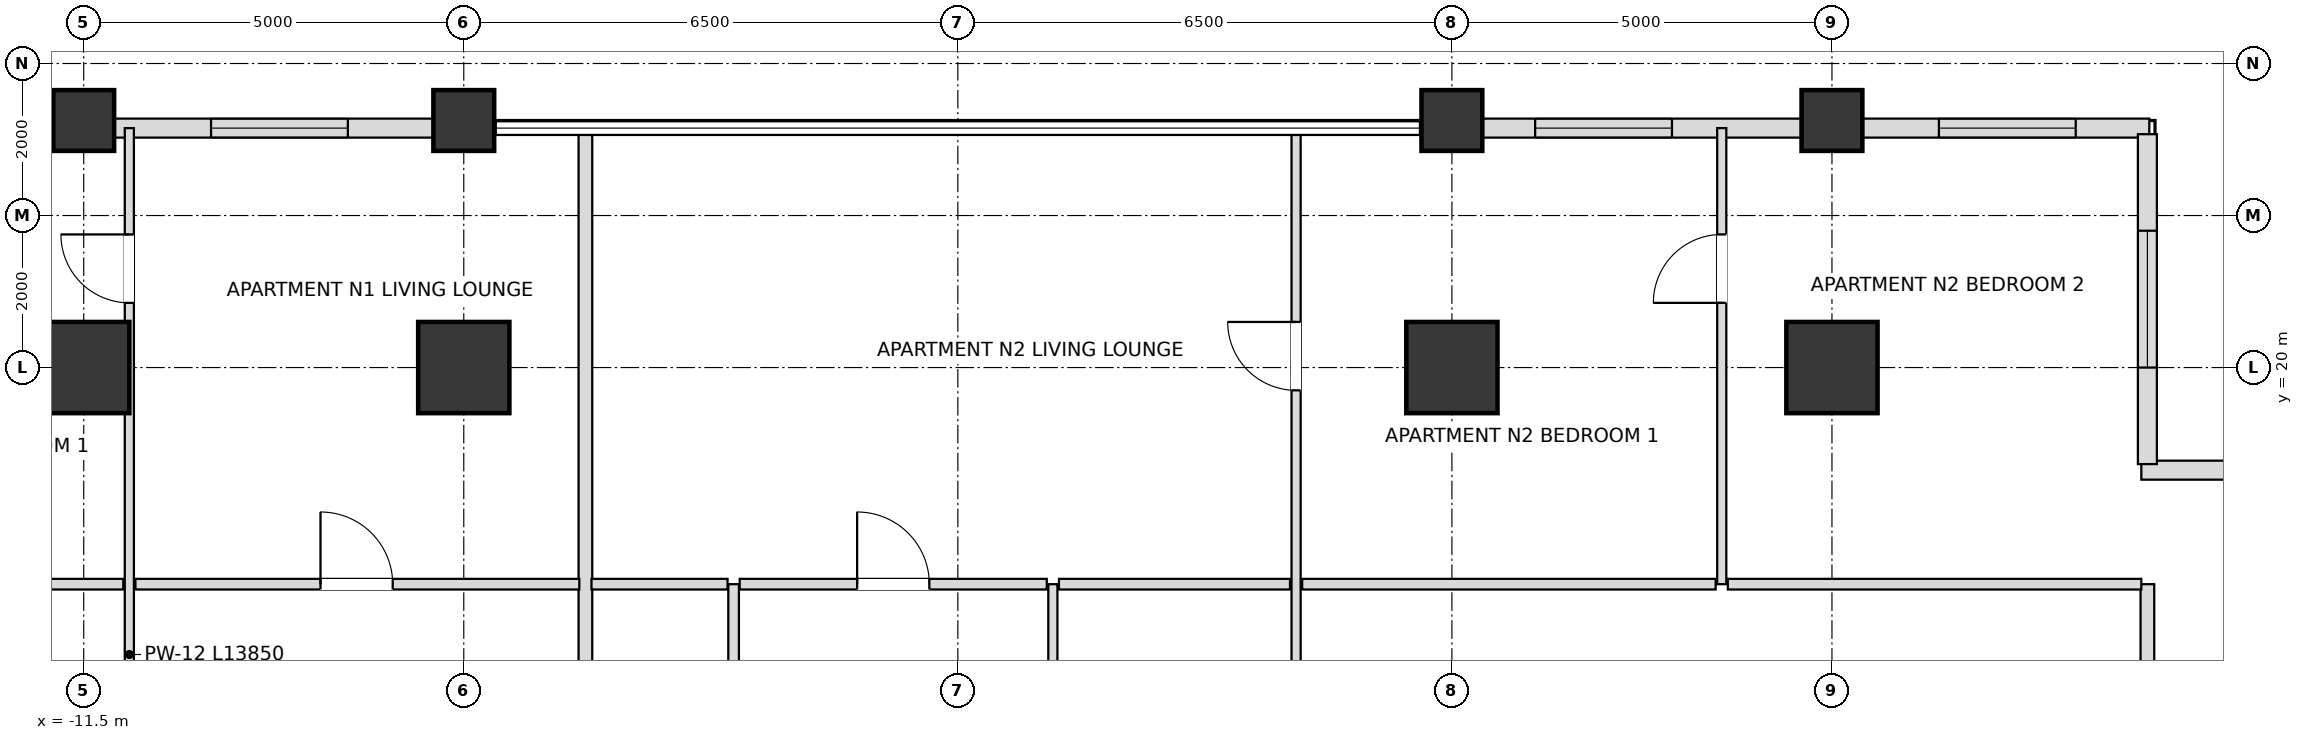
"""IFC4 building model, lengths in metres.
Left out: names, types, materials, properties, quantities, classifications, styles, units other than length and angle.
Written with IfcOpenShell. Run it as: python <this file> out.ifc"""

import sys

from ifc_helpers import new_model, si_unit, direction, frame, frame_2d, origin, origin_2d, place, context, subcontext, project, spatial, rectangle, extrude, element, fill, save


model = new_model("IFC4")
c1 = context("Model", 3, precision=1e-05, world=origin(), true_north=direction((0.0, 1.0)))
c2 = subcontext(c1, "Body", "Model", "MODEL_VIEW")
j1 = project(units=[si_unit("LENGTHUNIT", "METRE"), si_unit("PLANEANGLEUNIT", "RADIAN")], contexts=[c1])
p1 = place(None, origin())
s1 = spatial("IfcSite", under=j1, at=p1, CompositionType="ELEMENT")
p2 = place(p1, origin())
s2 = spatial("IfcBuilding", under=s1, at=p2, CompositionType="ELEMENT")
p3 = place(p2, frame((0.0, 0.0, 117.0)))
s3 = spatial("IfcBuildingStorey", under=s2, at=p3, CompositionType="ELEMENT", Elevation=117.0)
for number, where, z_axis, x_axis in (
    (1, (11.5, 20.0, 0.0), (0.0, 0.0, 1.0), (1.0, 0.0, 0.0)),
    (2, (6.5, 20.0, 0.0), (0.0, 0.0, 1.0), (1.0, 0.0, 0.0)),
    (3, (-6.5, 20.0, 0.0), (0.0, 0.0, 1.0), (1.0, 0.0, 0.0)),
    (4, (-11.5, 20.0, 0.0), (0.0, 0.0, 1.0), (1.0, 0.0, 0.0)),
):
    element("IfcColumn", number, at=place(p3, frame(where, z_axis=z_axis, x_axis=x_axis)), inside=s3, PredefinedType="USERDEFINED", context=c2, shape_type="SweptSolid", body=[
        extrude(rectangle(XDim=1.2, YDim=1.2, at=origin_2d()), origin(), (0.0, 0.0, 1.0), 3.6),
    ])
for number, where, z_axis, x_axis in (
    (5, (-11.5, 23.25, 0.0), (0.0, 0.0, 1.0), (1.0, 0.0, 0.0)),
    (6, (-6.5, 23.25, 0.0), (0.0, 0.0, 1.0), (1.0, 0.0, 0.0)),
    (7, (6.5, 23.25, 0.0), (0.0, 0.0, 1.0), (1.0, 0.0, 0.0)),
    (8, (11.5, 23.25, 0.0), (0.0, 0.0, 1.0), (1.0, 0.0, 0.0)),
):
    element("IfcColumn", number, at=place(p3, frame(where, z_axis=z_axis, x_axis=x_axis)), inside=s3, PredefinedType="COLUMN", context=c2, shape_type="SweptSolid", body=[
        extrude(rectangle(XDim=0.8, YDim=0.8, at=origin_2d()), origin(), (0.0, 0.0, 1.0), 3.6),
    ])
p4 = place(p3, frame((15.675, 23.15, 0.0), z_axis=(0.0, 0.0, 1.0), x_axis=(-1.0, 0.0, 0.0)))
e9 = element("IfcWall", 9, at=p4, inside=s3, PredefinedType="SOLIDWALL", context=c2, shape_type="SweptSolid", body=[
    extrude(rectangle(XDim=3.78, YDim=0.25, at=frame_2d((1.89, 0.0))), origin(), (0.0, 0.0, 1.0), 2.656),
])
p5 = place(p4, frame((0.968, 0.0, 0.72)))
e10 = element("IfcOpeningElement", 10, at=p5, cuts=e9, PredefinedType="OPENING", context=c2, shape_type="SweptSolid", body=[
    extrude(rectangle(XDim=1.8, YDim=1.68, at=frame_2d((0.9, 0.84))), frame((0.0, 0.135, 0.0), z_axis=(0.0, -1.0, 0.0), x_axis=(1.0, 0.0, 0.0)), (0.0, 0.0, 1.0), 0.27),
])
p6 = place(p3, frame((11.105, 23.15, 0.0), z_axis=(0.0, 0.0, 1.0), x_axis=(-1.0, 0.0, 0.0)))
e11 = element("IfcWall", 11, at=p6, inside=s3, PredefinedType="SOLIDWALL", context=c2, shape_type="SweptSolid", body=[
    extrude(rectangle(XDim=4.21, YDim=0.25, at=frame_2d((2.105, 0.0))), origin(), (0.0, 0.0, 1.0), 2.656),
])
p7 = place(p6, frame((1.71, 0.0, 0.72)))
e12 = element("IfcOpeningElement", 12, at=p7, cuts=e11, PredefinedType="OPENING", context=c2, shape_type="SweptSolid", body=[
    extrude(rectangle(XDim=1.8, YDim=1.68, at=frame_2d((0.9, 0.84))), frame((0.0, 0.135, 0.0), z_axis=(0.0, -1.0, 0.0), x_axis=(1.0, 0.0, 0.0)), (0.0, 0.0, 1.0), 0.27),
])
p8 = place(p3, frame((-6.895, 23.15, 0.0), z_axis=(0.0, 0.0, 1.0), x_axis=(-1.0, 0.0, 0.0)))
e13 = element("IfcWall", 13, at=p8, inside=s3, PredefinedType="SOLIDWALL", context=c2, shape_type="SweptSolid", body=[
    extrude(rectangle(XDim=4.21, YDim=0.25, at=frame_2d((2.105, 0.0))), origin(), (0.0, 0.0, 1.0), 2.656),
])
p9 = place(p8, frame((1.13, 0.0, 0.72)))
e14 = element("IfcOpeningElement", 14, at=p9, cuts=e13, PredefinedType="OPENING", context=c2, shape_type="SweptSolid", body=[
    extrude(rectangle(XDim=1.8, YDim=1.68, at=frame_2d((0.9, 0.84))), frame((0.0, 0.135, 0.0), z_axis=(0.0, -1.0, 0.0), x_axis=(1.0, 0.0, 0.0)), (0.0, 0.0, 1.0), 0.27),
])
p10 = place(p3, frame((-11.895, 23.15, 0.0), z_axis=(0.0, 0.0, 1.0), x_axis=(-1.0, 0.0, 0.0)))
e15 = element("IfcWall", 15, at=p10, inside=s3, PredefinedType="SOLIDWALL", context=c2, shape_type="SweptSolid", body=[
    extrude(rectangle(XDim=3.78, YDim=0.25, at=frame_2d((1.89, 0.0))), origin(), (0.0, 0.0, 1.0), 2.656),
])
p11 = place(p10, frame((1.013, 0.0, 0.72)))
e16 = element("IfcOpeningElement", 16, at=p11, cuts=e15, PredefinedType="OPENING", context=c2, shape_type="SweptSolid", body=[
    extrude(rectangle(XDim=1.8, YDim=1.68, at=frame_2d((0.9, 0.84))), frame((0.0, 0.135, 0.0), z_axis=(0.0, -1.0, 0.0), x_axis=(1.0, 0.0, 0.0)), (0.0, 0.0, 1.0), 0.27),
])
p12 = place(p3, frame((20.23, 18.65, 0.0), z_axis=(0.0, 0.0, 1.0), x_axis=(-1.0, 0.0, 0.0)))
e17 = element("IfcWall", 17, at=p12, inside=s3, PredefinedType="SOLIDWALL", context=c2, shape_type="SweptSolid", body=[
    extrude(rectangle(XDim=4.66, YDim=0.25, at=frame_2d((2.33, 0.0))), origin(), (0.0, 0.0, 1.0), 2.656),
])
p13 = place(p12, frame((1.43, 0.0, 0.72)))
e18 = element("IfcOpeningElement", 18, at=p13, cuts=e17, PredefinedType="OPENING", context=c2, shape_type="SweptSolid", body=[
    extrude(rectangle(XDim=1.8, YDim=1.68, at=frame_2d((0.9, 0.84))), frame((0.0, 0.135, 0.0), z_axis=(0.0, -1.0, 0.0), x_axis=(1.0, 0.0, 0.0)), (0.0, 0.0, 1.0), 0.27),
])
p14 = place(p3, frame((15.65, 18.73, 0.0), z_axis=(0.0, 0.0, 1.0), x_axis=(0.0, 1.0, 0.0)))
e19 = element("IfcWall", 19, at=p14, inside=s3, PredefinedType="SOLIDWALL", context=c2, shape_type="SweptSolid", body=[
    extrude(rectangle(XDim=4.34, YDim=0.25, at=frame_2d((2.17, 0.0))), origin(), (0.0, 0.0, 1.0), 2.656),
])
p15 = place(p14, frame((1.27, 0.0, 0.72)))
e20 = element("IfcOpeningElement", 20, at=p15, cuts=e19, PredefinedType="OPENING", context=c2, shape_type="SweptSolid", body=[
    extrude(rectangle(XDim=1.8, YDim=1.68, at=frame_2d((0.9, 0.84))), frame((0.0, 0.135, 0.0), z_axis=(0.0, -1.0, 0.0), x_axis=(1.0, 0.0, 0.0)), (0.0, 0.0, 1.0), 0.27),
])
p16 = place(p3, frame((-10.9, 9.3, 0.0), z_axis=(0.0, 0.0, 1.0), x_axis=(0.0, 1.0, 0.0)))
e21 = element("IfcWall", 21, at=p16, inside=s3, PredefinedType="PARTITIONING", context=c2, shape_type="SweptSolid", body=[
    extrude(rectangle(XDim=13.85, YDim=0.12, at=frame_2d((6.925, 0.0))), origin(), (0.0, 0.0, 1.0), 2.736),
])
p17 = place(p16, frame((4.219, 0.0, 0.0)))
e22 = element("IfcOpeningElement", 22, at=p17, cuts=e21, PredefinedType="OPENING", context=c2, shape_type="SweptSolid", body=[
    extrude(rectangle(XDim=0.95, YDim=2.1, at=frame_2d((0.475, 1.05))), frame((0.0, 0.07, 0.0), z_axis=(0.0, -1.0, 0.0), x_axis=(1.0, 0.0, 0.0)), (0.0, 0.0, 1.0), 0.14),
])
p18 = place(p16, frame((11.551, 0.0, 0.0)))
e23 = element("IfcOpeningElement", 23, at=p18, cuts=e21, PredefinedType="OPENING", context=c2, shape_type="SweptSolid", body=[
    extrude(rectangle(XDim=0.9, YDim=2.1, at=frame_2d((0.45, 1.05))), frame((0.0, 0.07, 0.0), z_axis=(0.0, -1.0, 0.0), x_axis=(1.0, 0.0, 0.0)), (0.0, 0.0, 1.0), 0.14),
])
p19 = place(p3, frame((-4.9, 9.3, 0.0), z_axis=(0.0, 0.0, 1.0), x_axis=(0.0, 1.0, 0.0)))
e24 = element("IfcWall", 24, at=p19, inside=s3, PredefinedType="PARTITIONING", context=c2, shape_type="SweptSolid", body=[
    extrude(rectangle(XDim=13.85, YDim=0.18, at=frame_2d((6.925, 0.0))), origin(), (0.0, 0.0, 1.0), 2.736),
])
p20 = place(p3, frame((-2.95, 9.3, 0.0), z_axis=(0.0, 0.0, 1.0), x_axis=(0.0, 1.0, 0.0)))
e25 = element("IfcWall", 25, at=p20, inside=s3, PredefinedType="PARTITIONING", context=c2, shape_type="SweptSolid", body=[
    extrude(rectangle(XDim=7.85, YDim=0.14, at=frame_2d((3.925, 0.0))), origin(), (0.0, 0.0, 1.0), 3.3),
])
p21 = place(p20, frame((3.47, 0.0, 0.0)))
e26 = element("IfcOpeningElement", 26, at=p21, cuts=e25, PredefinedType="OPENING", context=c2, shape_type="SweptSolid", body=[
    extrude(rectangle(XDim=0.9, YDim=2.1, at=frame_2d((0.45, 1.05))), frame((0.0, 0.08, 0.0), z_axis=(0.0, -1.0, 0.0), x_axis=(1.0, 0.0, 0.0)), (0.0, 0.0, 1.0), 0.16),
])
p22 = place(p3, frame((1.25, 9.3, 0.0), z_axis=(0.0, 0.0, 1.0), x_axis=(0.0, 1.0, 0.0)))
e27 = element("IfcWall", 27, at=p22, inside=s3, PredefinedType="PARTITIONING", context=c2, shape_type="SweptSolid", body=[
    extrude(rectangle(XDim=7.85, YDim=0.12, at=frame_2d((3.925, 0.0))), origin(), (0.0, 0.0, 1.0), 3.3),
])
p23 = place(p22, frame((3.445, 0.0, 0.0)))
e28 = element("IfcOpeningElement", 28, at=p23, cuts=e27, PredefinedType="OPENING", context=c2, shape_type="SweptSolid", body=[
    extrude(rectangle(XDim=0.95, YDim=2.1, at=frame_2d((0.475, 1.05))), frame((0.0, 0.07, 0.0), z_axis=(0.0, -1.0, 0.0), x_axis=(1.0, 0.0, 0.0)), (0.0, 0.0, 1.0), 0.14),
])
p24 = place(p3, frame((4.45, 9.3, 0.0), z_axis=(0.0, 0.0, 1.0), x_axis=(0.0, 1.0, 0.0)))
e29 = element("IfcWall", 29, at=p24, inside=s3, PredefinedType="PARTITIONING", context=c2, shape_type="SweptSolid", body=[
    extrude(rectangle(XDim=13.85, YDim=0.12, at=frame_2d((6.925, 0.0))), origin(), (0.0, 0.0, 1.0), 2.736),
])
p25 = place(p24, frame((3.445, 0.0, 0.0)))
e30 = element("IfcOpeningElement", 30, at=p25, cuts=e29, PredefinedType="OPENING", context=c2, shape_type="SweptSolid", body=[
    extrude(rectangle(XDim=0.95, YDim=2.1, at=frame_2d((0.475, 1.05))), frame((0.0, 0.07, 0.0), z_axis=(0.0, -1.0, 0.0), x_axis=(1.0, 0.0, 0.0)), (0.0, 0.0, 1.0), 0.14),
])
p26 = place(p24, frame((10.4, 0.0, 0.0)))
e31 = element("IfcOpeningElement", 31, at=p26, cuts=e29, PredefinedType="OPENING", context=c2, shape_type="SweptSolid", body=[
    extrude(rectangle(XDim=0.9, YDim=2.1, at=frame_2d((0.45, 1.05))), frame((0.0, 0.07, 0.0), z_axis=(0.0, -1.0, 0.0), x_axis=(1.0, 0.0, 0.0)), (0.0, 0.0, 1.0), 0.14),
])
p27 = place(p3, frame((10.05, 17.15, 0.0), z_axis=(0.0, 0.0, 1.0), x_axis=(0.0, 1.0, 0.0)))
e32 = element("IfcWall", 32, at=p27, inside=s3, PredefinedType="PARTITIONING", context=c2, shape_type="SweptSolid", body=[
    extrude(rectangle(XDim=6.0, YDim=0.12, at=frame_2d((3.0, 0.0))), origin(), (0.0, 0.0, 1.0), 2.736),
])
p28 = place(p27, frame((3.701, 0.0, 0.0)))
e33 = element("IfcOpeningElement", 33, at=p28, cuts=e32, PredefinedType="OPENING", context=c2, shape_type="SweptSolid", body=[
    extrude(rectangle(XDim=0.9, YDim=2.1, at=frame_2d((0.45, 1.05))), frame((0.0, 0.07, 0.0), z_axis=(0.0, -1.0, 0.0), x_axis=(1.0, 0.0, 0.0)), (0.0, 0.0, 1.0), 0.14),
])
p29 = place(p3, frame((15.65, 9.3, 0.0), z_axis=(0.0, 0.0, 1.0), x_axis=(0.0, 1.0, 0.0)))
e34 = element("IfcWall", 34, at=p29, inside=s3, PredefinedType="PARTITIONING", context=c2, shape_type="SweptSolid", body=[
    extrude(rectangle(XDim=7.85, YDim=0.18, at=frame_2d((3.925, 0.0))), origin(), (0.0, 0.0, 1.0), 2.656),
])
p30 = place(p3, frame((-13.62, 17.15, 0.0), z_axis=(0.0, 0.0, 1.0), x_axis=(1.0, 0.0, 0.0)))
e35 = element("IfcWall", 35, at=p30, inside=s3, PredefinedType="PARTITIONING", context=c2, shape_type="SweptSolid", body=[
    extrude(rectangle(XDim=2.64, YDim=0.14, at=frame_2d((1.32, 0.0))), origin(), (0.0, 0.0, 1.0), 2.656),
])
p31 = place(p3, frame((-10.82, 17.15, 0.0), z_axis=(0.0, 0.0, 1.0), x_axis=(1.0, 0.0, 0.0)))
e36 = element("IfcWall", 36, at=p31, inside=s3, PredefinedType="PARTITIONING", context=c2, shape_type="SweptSolid", body=[
    extrude(rectangle(XDim=5.84, YDim=0.14, at=frame_2d((2.92, 0.0))), origin(), (0.0, 0.0, 1.0), 2.736),
])
p32 = place(p31, frame((2.435, 0.0, 0.0)))
e37 = element("IfcOpeningElement", 37, at=p32, cuts=e36, PredefinedType="OPENING", context=c2, shape_type="SweptSolid", body=[
    extrude(rectangle(XDim=0.95, YDim=2.1, at=frame_2d((0.475, 1.05))), frame((0.0, 0.08, 0.0), z_axis=(0.0, -1.0, 0.0), x_axis=(1.0, 0.0, 0.0)), (0.0, 0.0, 1.0), 0.16),
])
p33 = place(p3, frame((-4.82, 17.15, 0.0), z_axis=(0.0, 0.0, 1.0), x_axis=(1.0, 0.0, 0.0)))
e38 = element("IfcWall", 38, at=p33, inside=s3, PredefinedType="PARTITIONING", context=c2, shape_type="SweptSolid", body=[
    extrude(rectangle(XDim=1.79, YDim=0.14, at=frame_2d((0.895, 0.0))), origin(), (0.0, 0.0, 1.0), 3.3),
])
p34 = place(p3, frame((-2.87, 17.15, 0.0), z_axis=(0.0, 0.0, 1.0), x_axis=(1.0, 0.0, 0.0)))
e39 = element("IfcWall", 39, at=p34, inside=s3, PredefinedType="PARTITIONING", context=c2, shape_type="SweptSolid", body=[
    extrude(rectangle(XDim=4.04, YDim=0.14, at=frame_2d((2.02, 0.0))), origin(), (0.0, 0.0, 1.0), 3.3),
])
p35 = place(p34, frame((1.545, 0.0, 0.0)))
e40 = element("IfcOpeningElement", 40, at=p35, cuts=e39, PredefinedType="OPENING", context=c2, shape_type="SweptSolid", body=[
    extrude(rectangle(XDim=0.95, YDim=2.1, at=frame_2d((0.475, 1.05))), frame((0.0, 0.08, 0.0), z_axis=(0.0, -1.0, 0.0), x_axis=(1.0, 0.0, 0.0)), (0.0, 0.0, 1.0), 0.16),
])
p36 = place(p3, frame((1.33, 17.15, 0.0), z_axis=(0.0, 0.0, 1.0), x_axis=(1.0, 0.0, 0.0)))
e41 = element("IfcWall", 41, at=p36, inside=s3, PredefinedType="PARTITIONING", context=c2, shape_type="SweptSolid", body=[
    extrude(rectangle(XDim=3.04, YDim=0.14, at=frame_2d((1.52, 0.0))), origin(), (0.0, 0.0, 1.0), 3.3),
])
p37 = place(p3, frame((4.53, 17.15, 0.0), z_axis=(0.0, 0.0, 1.0), x_axis=(1.0, 0.0, 0.0)))
e42 = element("IfcWall", 42, at=p37, inside=s3, PredefinedType="PARTITIONING", context=c2, shape_type="SweptSolid", body=[
    extrude(rectangle(XDim=5.44, YDim=0.14, at=frame_2d((2.72, 0.0))), origin(), (0.0, 0.0, 1.0), 2.736),
])
p38 = place(p3, frame((10.13, 17.15, 0.0), z_axis=(0.0, 0.0, 1.0), x_axis=(1.0, 0.0, 0.0)))
e43 = element("IfcWall", 43, at=p38, inside=s3, PredefinedType="PARTITIONING", context=c2, shape_type="SweptSolid", body=[
    extrude(rectangle(XDim=5.44, YDim=0.14, at=frame_2d((2.72, 0.0))), origin(), (0.0, 0.0, 1.0), 2.656),
])
p39 = place(p5, origin())
e44 = element("IfcWindow", 44, at=p39, inside=s3, PartitioningType="SINGLE_PANEL", PredefinedType="WINDOW", context=c2, shape_type="SweptSolid", body=[
    extrude(rectangle(XDim=1.8, YDim=1.68, at=frame_2d((0.9, 0.84))), frame((0.0, 0.03, 0.0), z_axis=(0.0, -1.0, 0.0), x_axis=(1.0, 0.0, 0.0)), (0.0, 0.0, 1.0), 0.06),
])
fill(e10, e44)
p40 = place(p7, origin())
e45 = element("IfcWindow", 45, at=p40, inside=s3, PartitioningType="SINGLE_PANEL", PredefinedType="WINDOW", context=c2, shape_type="SweptSolid", body=[
    extrude(rectangle(XDim=1.8, YDim=1.68, at=frame_2d((0.9, 0.84))), frame((0.0, 0.03, 0.0), z_axis=(0.0, -1.0, 0.0), x_axis=(1.0, 0.0, 0.0)), (0.0, 0.0, 1.0), 0.06),
])
fill(e12, e45)
p41 = place(p9, origin())
e46 = element("IfcWindow", 46, at=p41, inside=s3, PartitioningType="SINGLE_PANEL", PredefinedType="WINDOW", context=c2, shape_type="SweptSolid", body=[
    extrude(rectangle(XDim=1.8, YDim=1.68, at=frame_2d((0.9, 0.84))), frame((0.0, 0.03, 0.0), z_axis=(0.0, -1.0, 0.0), x_axis=(1.0, 0.0, 0.0)), (0.0, 0.0, 1.0), 0.06),
])
fill(e14, e46)
p42 = place(p15, origin())
e47 = element("IfcWindow", 47, at=p42, inside=s3, PartitioningType="SINGLE_PANEL", PredefinedType="WINDOW", context=c2, shape_type="SweptSolid", body=[
    extrude(rectangle(XDim=1.8, YDim=1.68, at=frame_2d((0.9, 0.84))), frame((0.0, 0.03, 0.0), z_axis=(0.0, -1.0, 0.0), x_axis=(1.0, 0.0, 0.0)), (0.0, 0.0, 1.0), 0.06),
])
fill(e20, e47)
p43 = place(p32, origin())
e48 = element("IfcDoor", 48, at=p43, inside=s3, OperationType="SINGLE_SWING_LEFT", PredefinedType="DOOR", context=c2, shape_type="SweptSolid", body=[
    extrude(rectangle(XDim=0.95, YDim=2.1, at=frame_2d((0.475, 1.05))), frame((0.0, 0.025, 0.0), z_axis=(0.0, -1.0, 0.0), x_axis=(1.0, 0.0, 0.0)), (0.0, 0.0, 1.0), 0.05),
])
fill(e37, e48)
p44 = place(p18, origin())
e49 = element("IfcDoor", 49, at=p44, inside=s3, OperationType="SINGLE_SWING_RIGHT", PredefinedType="DOOR", context=c2, shape_type="SweptSolid", body=[
    extrude(rectangle(XDim=0.9, YDim=2.1, at=frame_2d((0.45, 1.05))), frame((0.0, 0.025, 0.0), z_axis=(0.0, -1.0, 0.0), x_axis=(1.0, 0.0, 0.0)), (0.0, 0.0, 1.0), 0.05),
])
fill(e23, e49)
p45 = place(p35, origin())
e50 = element("IfcDoor", 50, at=p45, inside=s3, OperationType="SINGLE_SWING_LEFT", PredefinedType="DOOR", context=c2, shape_type="SweptSolid", body=[
    extrude(rectangle(XDim=0.95, YDim=2.1, at=frame_2d((0.475, 1.05))), frame((0.0, 0.025, 0.0), z_axis=(0.0, -1.0, 0.0), x_axis=(1.0, 0.0, 0.0)), (0.0, 0.0, 1.0), 0.05),
])
fill(e40, e50)
p46 = place(p26, origin())
e51 = element("IfcDoor", 51, at=p46, inside=s3, OperationType="SINGLE_SWING_RIGHT", PredefinedType="DOOR", context=c2, shape_type="SweptSolid", body=[
    extrude(rectangle(XDim=0.9, YDim=2.1, at=frame_2d((0.45, 1.05))), frame((0.0, 0.025, 0.0), z_axis=(0.0, -1.0, 0.0), x_axis=(1.0, 0.0, 0.0)), (0.0, 0.0, 1.0), 0.05),
])
fill(e31, e51)
p47 = place(p28, origin())
e52 = element("IfcDoor", 52, at=p47, inside=s3, OperationType="SINGLE_SWING_LEFT", PredefinedType="DOOR", context=c2, shape_type="SweptSolid", body=[
    extrude(rectangle(XDim=0.9, YDim=2.1, at=frame_2d((0.45, 1.05))), frame((0.0, 0.025, 0.0), z_axis=(0.0, -1.0, 0.0), x_axis=(1.0, 0.0, 0.0)), (0.0, 0.0, 1.0), 0.05),
])
fill(e33, e52)
save(model, sys.argv[1])
